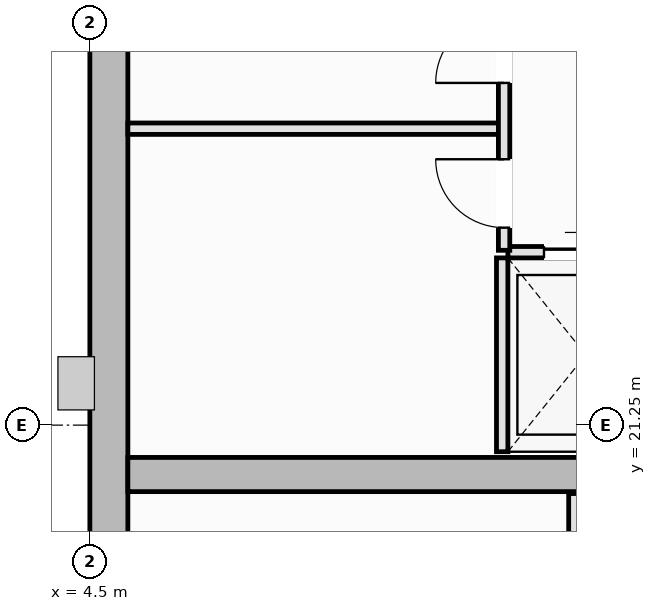
"""IFC4 building model, lengths in metres.
Left out: names, types, materials, properties, quantities, classifications, styles, units other than length and angle.
Written with IfcOpenShell. Run it as: python <this file> out.ifc"""

import sys

from ifc_helpers import new_model, si_unit, direction, frame, frame_2d, origin, place, context, subcontext, project, spatial, rectangle, extrude, element, fill, save


model = new_model("IFC4")
c1 = context("Model", 3, precision=1e-05, world=origin(), true_north=direction((0.0, 1.0)))
c2 = subcontext(c1, "Body", "Model", "MODEL_VIEW")
j1 = project(units=[si_unit("LENGTHUNIT", "METRE"), si_unit("PLANEANGLEUNIT", "RADIAN")], contexts=[c1])
p1 = place(None, origin())
s1 = spatial("IfcSite", under=j1, at=p1, CompositionType="ELEMENT")
p2 = place(p1, origin())
s2 = spatial("IfcBuilding", under=s1, at=p2, CompositionType="ELEMENT")
p3 = place(p2, frame((0.0, 0.0, 281.2)))
s3 = spatial("IfcBuildingStorey", under=s2, at=p3, CompositionType="ELEMENT", Elevation=281.2)
p4 = place(p3, frame((4.75, 14.5, 0.0), z_axis=(0.0, 0.0, 1.0), x_axis=(0.0, 1.0, 0.0)))
e1 = element("IfcWall", 1, at=p4, inside=s3, PredefinedType="SHEAR", context=c2, shape_type="SweptSolid", body=[
    extrude(rectangle(XDim=21.5, YDim=0.5, at=frame_2d((10.75, 0.0))), origin(), (0.0, 0.0, 1.0), 3.55),
])
p5 = place(p3, frame((5.0, 20.6, 0.0), z_axis=(0.0, 0.0, 1.0), x_axis=(1.0, 0.0, 0.0)))
e2 = element("IfcWall", 2, at=p5, inside=s3, PredefinedType="SHEAR", context=c2, shape_type="SweptSolid", body=[
    extrude(rectangle(XDim=12.5, YDim=0.45, at=frame_2d((6.25, 0.0))), origin(), (0.0, 0.0, 1.0), 3.55),
])
p6 = place(p3, frame((10.0, 23.525, 0.0), z_axis=(0.0, 0.0, 1.0), x_axis=(1.0, 0.0, 0.0)))
e3 = element("IfcWall", 3, at=p6, inside=s3, PredefinedType="PARTITIONING", context=c2, shape_type="SweptSolid", body=[
    extrude(rectangle(XDim=2.05, YDim=0.15, at=frame_2d((1.025, 0.0))), origin(), (0.0, 0.0, 1.0), 3.39),
])
p7 = place(p6, frame((0.475, 0.0, 0.0)))
e4 = element("IfcOpeningElement", 4, at=p7, cuts=e3, PredefinedType="OPENING", context=c2, shape_type="SweptSolid", body=[
    extrude(rectangle(XDim=1.1, YDim=2.2, at=frame_2d((0.55, 1.1))), frame((0.0, 0.085, 0.0), z_axis=(0.0, -1.0, 0.0), x_axis=(1.0, 0.0, 0.0)), (0.0, 0.0, 1.0), 0.17),
])
p8 = place(p3, frame((9.925, 20.9, 0.0), z_axis=(0.0, 0.0, 1.0), x_axis=(0.0, 1.0, 0.0)))
e5 = element("IfcWall", 5, at=p8, inside=s3, PredefinedType="PARTITIONING", context=c2, shape_type="SweptSolid", body=[
    extrude(rectangle(XDim=2.55, YDim=0.15, at=frame_2d((1.275, 0.0))), origin(), (0.0, 0.0, 1.0), 3.39),
])
p9 = place(p3, frame((10.875, 18.55, 0.0), z_axis=(0.0, 0.0, 1.0), x_axis=(0.0, 1.0, 0.0)))
e6 = element("IfcWall", 6, at=p9, inside=s3, PredefinedType="PARTITIONING", context=c2, shape_type="SweptSolid", body=[
    extrude(rectangle(XDim=1.8, YDim=0.15, at=frame_2d((0.9, 0.0))), origin(), (0.0, 0.0, 1.0), 3.39),
])
p10 = place(p3, frame((5.0, 25.15, 0.0), z_axis=(0.0, 0.0, 1.0), x_axis=(1.0, 0.0, 0.0)))
e7 = element("IfcWall", 7, at=p10, inside=s3, PredefinedType="PARTITIONING", context=c2, shape_type="SweptSolid", body=[
    extrude(rectangle(XDim=4.95, YDim=0.15, at=frame_2d((2.475, 0.0))), origin(), (0.0, 0.0, 1.0), 3.39),
])
p11 = place(p3, frame((9.95, 23.55, 0.0), z_axis=(0.0, 0.0, 1.0), x_axis=(0.0, 1.0, 0.0)))
e8 = element("IfcWall", 8, at=p11, inside=s3, PredefinedType="PARTITIONING", context=c2, shape_type="SweptSolid", body=[
    extrude(rectangle(XDim=3.4, YDim=0.15, at=frame_2d((1.7, 0.0))), origin(), (0.0, 0.0, 1.0), 3.39),
])
p12 = place(p11, frame((0.298, 0.0, 0.0)))
e9 = element("IfcOpeningElement", 9, at=p12, cuts=e8, PredefinedType="OPENING", context=c2, shape_type="SweptSolid", body=[
    extrude(rectangle(XDim=0.9, YDim=2.1, at=frame_2d((0.45, 1.05))), frame((0.0, 0.085, 0.0), z_axis=(0.0, -1.0, 0.0), x_axis=(1.0, 0.0, 0.0)), (0.0, 0.0, 1.0), 0.17),
])
p13 = place(p11, frame((2.202, 0.0, 0.0)))
e10 = element("IfcOpeningElement", 10, at=p13, cuts=e8, PredefinedType="OPENING", context=c2, shape_type="SweptSolid", body=[
    extrude(rectangle(XDim=0.9, YDim=2.1, at=frame_2d((0.45, 1.05))), frame((0.0, 0.085, 0.0), z_axis=(0.0, -1.0, 0.0), x_axis=(1.0, 0.0, 0.0)), (0.0, 0.0, 1.0), 0.17),
])
p14 = place(p7, origin())
e11 = element("IfcDoor", 11, at=p14, inside=s3, OperationType="DOUBLE_DOOR_SLIDING", PredefinedType="DOOR", context=c2, shape_type="SweptSolid", body=[
    extrude(rectangle(XDim=1.1, YDim=2.2, at=frame_2d((0.55, 1.1))), frame((0.0, 0.025, 0.0), z_axis=(0.0, -1.0, 0.0), x_axis=(1.0, 0.0, 0.0)), (0.0, 0.0, 1.0), 0.05),
])
fill(e4, e11)
p15 = place(p12, origin())
e12 = element("IfcDoor", 12, at=p15, inside=s3, OperationType="SINGLE_SWING_RIGHT", PredefinedType="DOOR", context=c2, shape_type="SweptSolid", body=[
    extrude(rectangle(XDim=0.9, YDim=2.1, at=frame_2d((0.45, 1.05))), frame((0.0, 0.025, 0.0), z_axis=(0.0, -1.0, 0.0), x_axis=(1.0, 0.0, 0.0)), (0.0, 0.0, 1.0), 0.05),
])
fill(e9, e12)
p16 = place(p13, origin())
e13 = element("IfcDoor", 13, at=p16, inside=s3, OperationType="SINGLE_SWING_LEFT", PredefinedType="DOOR", context=c2, shape_type="SweptSolid", body=[
    extrude(rectangle(XDim=0.9, YDim=2.1, at=frame_2d((0.45, 1.05))), frame((0.0, 0.025, 0.0), z_axis=(0.0, -1.0, 0.0), x_axis=(1.0, 0.0, 0.0)), (0.0, 0.0, 1.0), 0.05),
])
fill(e10, e13)
save(model, sys.argv[1])
